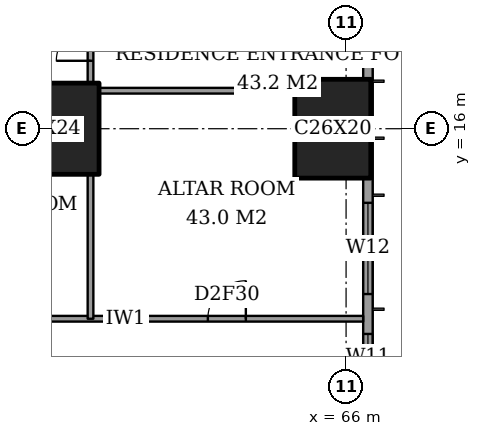
"""IFC4 building model, lengths in metres.
Left out: names, types, materials, properties, quantities, classifications, styles, units other than length and angle.
Written with IfcOpenShell. Run it as: python <this file> out.ifc"""

import sys

from ifc_helpers import new_model, si_unit, direction, frame, frame_2d, origin, origin_2d, place, context, subcontext, project, spatial, rectangle, extrude, element, fill, save


model = new_model("IFC4")
c1 = context("Model", 3, precision=1e-05, world=origin(), true_north=direction((0.0, 1.0)))
c2 = subcontext(c1, "Body", "Model", "MODEL_VIEW")
j1 = project(units=[si_unit("LENGTHUNIT", "METRE"), si_unit("PLANEANGLEUNIT", "RADIAN")], contexts=[c1])
p1 = place(None, origin())
s1 = spatial("IfcSite", under=j1, at=p1, CompositionType="ELEMENT")
p2 = place(p1, origin())
s2 = spatial("IfcBuilding", under=s1, at=p2, CompositionType="ELEMENT")
p3 = place(p2, frame((0.0, 0.0, 153.8)))
s3 = spatial("IfcBuildingStorey", under=s2, at=p3, CompositionType="ELEMENT", Elevation=153.8)
p4 = place(p3, frame((58.0, 16.0, 0.0), z_axis=(0.0, 0.0, 1.0), x_axis=(1.0, 0.0, 0.0)))
e1 = element("IfcColumn", 1, at=p4, inside=s3, PredefinedType="COLUMN", context=c2, shape_type="SweptSolid", body=[
    extrude(rectangle(XDim=3.0, YDim=2.4, at=origin_2d()), origin(), (0.0, 0.0, 1.0), 3.6),
])
p5 = place(p3, frame((65.65, 16.0, 0.0), z_axis=(0.0, 0.0, 1.0), x_axis=(0.0, 1.0, 0.0)))
e2 = element("IfcColumn", 2, at=p5, inside=s3, PredefinedType="COLUMN", context=c2, shape_type="SweptSolid", body=[
    extrude(rectangle(XDim=2.6, YDim=2.0, at=origin_2d()), origin(), (0.0, 0.0, 1.0), 3.6),
])
p6 = place(p3, frame((66.575, 3.175, 0.0), z_axis=(0.0, 0.0, 1.0), x_axis=(0.0, 1.0, 0.0)))
e3 = element("IfcWall", 3, at=p6, inside=s3, PredefinedType="SOLIDWALL", context=c2, shape_type="SweptSolid", body=[
    extrude(rectangle(XDim=41.65, YDim=0.25, at=frame_2d((20.825, 0.0))), origin(), (0.0, 0.0, 1.0), 3.6),
])
p7 = place(p6, frame((0.775, 0.0, 0.4)))
e4 = element("IfcOpeningElement", 4, at=p7, cuts=e3, PredefinedType="OPENING", context=c2, shape_type="SweptSolid", body=[
    extrude(rectangle(XDim=2.4, YDim=2.2, at=frame_2d((1.2, 1.1))), frame((0.0, 0.135, 0.0), z_axis=(0.0, -1.0, 0.0), x_axis=(1.0, 0.0, 0.0)), (0.0, 0.0, 1.0), 0.27),
])
p8 = place(p6, frame((6.225, 0.0, 0.4)))
e5 = element("IfcOpeningElement", 5, at=p8, cuts=e3, PredefinedType="OPENING", context=c2, shape_type="SweptSolid", body=[
    extrude(rectangle(XDim=1.2, YDim=2.2, at=frame_2d((0.6, 1.1))), frame((0.0, 0.135, 0.0), z_axis=(0.0, -1.0, 0.0), x_axis=(1.0, 0.0, 0.0)), (0.0, 0.0, 1.0), 0.27),
])
p9 = place(p6, frame((8.475, 0.0, 0.4)))
e6 = element("IfcOpeningElement", 6, at=p9, cuts=e3, PredefinedType="OPENING", context=c2, shape_type="SweptSolid", body=[
    extrude(rectangle(XDim=2.4, YDim=2.2, at=frame_2d((1.2, 1.1))), frame((0.0, 0.135, 0.0), z_axis=(0.0, -1.0, 0.0), x_axis=(1.0, 0.0, 0.0)), (0.0, 0.0, 1.0), 0.27),
])
p10 = place(p6, frame((15.775, 0.0, 0.4)))
e7 = element("IfcOpeningElement", 7, at=p10, cuts=e3, PredefinedType="OPENING", context=c2, shape_type="SweptSolid", body=[
    extrude(rectangle(XDim=2.4, YDim=2.2, at=frame_2d((1.2, 1.1))), frame((0.0, 0.135, 0.0), z_axis=(0.0, -1.0, 0.0), x_axis=(1.0, 0.0, 0.0)), (0.0, 0.0, 1.0), 0.27),
])
p11 = place(p6, frame((23.475, 0.0, 0.4)))
e8 = element("IfcOpeningElement", 8, at=p11, cuts=e3, PredefinedType="OPENING", context=c2, shape_type="SweptSolid", body=[
    extrude(rectangle(XDim=2.4, YDim=2.2, at=frame_2d((1.2, 1.1))), frame((0.0, 0.135, 0.0), z_axis=(0.0, -1.0, 0.0), x_axis=(1.0, 0.0, 0.0)), (0.0, 0.0, 1.0), 0.27),
])
p12 = place(p6, frame((30.975, 0.0, 0.4)))
e9 = element("IfcOpeningElement", 9, at=p12, cuts=e3, PredefinedType="OPENING", context=c2, shape_type="SweptSolid", body=[
    extrude(rectangle(XDim=2.4, YDim=2.2, at=frame_2d((1.2, 1.1))), frame((0.0, 0.135, 0.0), z_axis=(0.0, -1.0, 0.0), x_axis=(1.0, 0.0, 0.0)), (0.0, 0.0, 1.0), 0.27),
])
p13 = place(p6, frame((34.5, 0.0, 0.4)))
e10 = element("IfcOpeningElement", 10, at=p13, cuts=e3, PredefinedType="OPENING", context=c2, shape_type="SweptSolid", body=[
    extrude(rectangle(XDim=1.2, YDim=2.2, at=frame_2d((0.6, 1.1))), frame((0.0, 0.135, 0.0), z_axis=(0.0, -1.0, 0.0), x_axis=(1.0, 0.0, 0.0)), (0.0, 0.0, 1.0), 0.27),
])
p14 = place(p6, frame((38.475, 0.0, 0.4)))
e11 = element("IfcOpeningElement", 11, at=p14, cuts=e3, PredefinedType="OPENING", context=c2, shape_type="SweptSolid", body=[
    extrude(rectangle(XDim=2.4, YDim=2.2, at=frame_2d((1.2, 1.1))), frame((0.0, 0.135, 0.0), z_axis=(0.0, -1.0, 0.0), x_axis=(1.0, 0.0, 0.0)), (0.0, 0.0, 1.0), 0.27),
])
p15 = place(p3, frame((41.439, 11.0, 0.0), z_axis=(0.0, 0.0, 1.0), x_axis=(1.0, 0.0, 0.0)))
e12 = element("IfcWall", 12, at=p15, inside=s3, PredefinedType="PARTITIONING", context=c2, shape_type="SweptSolid", body=[
    extrude(rectangle(XDim=25.011, YDim=0.15, at=frame_2d((12.505, 0.0))), origin(), (0.0, 0.0, 1.0), 3.35),
])
p16 = place(p15, frame((12.361, 0.0, 0.0)))
e13 = element("IfcOpeningElement", 13, at=p16, cuts=e12, PredefinedType="OPENING", context=c2, shape_type="SweptSolid", body=[
    extrude(rectangle(XDim=1.0, YDim=2.1, at=frame_2d((0.5, 1.05))), frame((0.0, 0.085, 0.0), z_axis=(0.0, -1.0, 0.0), x_axis=(1.0, 0.0, 0.0)), (0.0, 0.0, 1.0), 0.17),
])
p17 = place(p15, frame((20.924, 0.0, 0.0)))
e14 = element("IfcOpeningElement", 14, at=p17, cuts=e12, PredefinedType="OPENING", context=c2, shape_type="SweptSolid", body=[
    extrude(rectangle(XDim=1.0, YDim=2.1, at=frame_2d((0.5, 1.05))), frame((0.0, 0.085, 0.0), z_axis=(0.0, -1.0, 0.0), x_axis=(1.0, 0.0, 0.0)), (0.0, 0.0, 1.0), 0.17),
])
p18 = place(p15, frame((15.448, 0.0, 0.0)))
e15 = element("IfcOpeningElement", 15, at=p18, cuts=e12, PredefinedType="OPENING", context=c2, shape_type="SweptSolid", body=[
    extrude(rectangle(XDim=0.9, YDim=2.1, at=frame_2d((0.45, 1.05))), frame((0.0, 0.085, 0.0), z_axis=(0.0, -1.0, 0.0), x_axis=(1.0, 0.0, 0.0)), (0.0, 0.0, 1.0), 0.17),
])
p19 = place(p15, frame((9.961, 0.0, 0.0)))
e16 = element("IfcOpeningElement", 16, at=p19, cuts=e12, PredefinedType="OPENING", context=c2, shape_type="SweptSolid", body=[
    extrude(rectangle(XDim=1.0, YDim=2.1, at=frame_2d((0.5, 1.05))), frame((0.0, 0.085, 0.0), z_axis=(0.0, -1.0, 0.0), x_axis=(1.0, 0.0, 0.0)), (0.0, 0.0, 1.0), 0.17),
])
p20 = place(p15, frame((7.411, 0.0, 0.0)))
e17 = element("IfcOpeningElement", 17, at=p20, cuts=e12, PredefinedType="OPENING", context=c2, shape_type="SweptSolid", body=[
    extrude(rectangle(XDim=0.9, YDim=2.1, at=frame_2d((0.45, 1.05))), frame((0.0, 0.085, 0.0), z_axis=(0.0, -1.0, 0.0), x_axis=(1.0, 0.0, 0.0)), (0.0, 0.0, 1.0), 0.17),
])
p21 = place(p15, frame((2.836, 0.0, 0.0)))
e18 = element("IfcOpeningElement", 18, at=p21, cuts=e12, PredefinedType="OPENING", context=c2, shape_type="SweptSolid", body=[
    extrude(rectangle(XDim=1.0, YDim=2.1, at=frame_2d((0.5, 1.05))), frame((0.0, 0.085, 0.0), z_axis=(0.0, -1.0, 0.0), x_axis=(1.0, 0.0, 0.0)), (0.0, 0.0, 1.0), 0.17),
])
p22 = place(p3, frame((59.5, 17.0, 0.0), z_axis=(0.0, 0.0, 1.0), x_axis=(1.0, 0.0, 0.0)))
e19 = element("IfcWall", 19, at=p22, inside=s3, PredefinedType="PARTITIONING", context=c2, shape_type="SweptSolid", body=[
    extrude(rectangle(XDim=5.15, YDim=0.15, at=frame_2d((2.575, 0.0))), origin(), (0.0, 0.0, 1.0), 3.35),
])
p23 = place(p3, frame((59.275, 11.0, 0.0), z_axis=(0.0, 0.0, 1.0), x_axis=(0.0, 1.0, 0.0)))
e20 = element("IfcWall", 20, at=p23, inside=s3, PredefinedType="PARTITIONING", context=c2, shape_type="SweptSolid", body=[
    extrude(rectangle(XDim=3.8, YDim=0.15, at=frame_2d((1.9, 0.0))), origin(), (0.0, 0.0, 1.0), 3.35),
])
p24 = place(p3, frame((59.275, 17.2, 0.0), z_axis=(0.0, 0.0, 1.0), x_axis=(0.0, 1.0, 0.0)))
e21 = element("IfcWall", 21, at=p24, inside=s3, PredefinedType="PARTITIONING", context=c2, shape_type="SweptSolid", body=[
    extrude(rectangle(XDim=2.45, YDim=0.15, at=frame_2d((1.225, 0.0))), origin(), (0.0, 0.0, 1.0), 3.35),
])
p25 = place(p24, frame((0.587, 0.0, 0.0)))
e22 = element("IfcOpeningElement", 22, at=p25, cuts=e21, PredefinedType="OPENING", context=c2, shape_type="SweptSolid", body=[
    extrude(rectangle(XDim=0.9, YDim=2.1, at=frame_2d((0.45, 1.05))), frame((0.0, 0.085, 0.0), z_axis=(0.0, -1.0, 0.0), x_axis=(1.0, 0.0, 0.0)), (0.0, 0.0, 1.0), 0.17),
])
p26 = place(p8, origin())
e23 = element("IfcWindow", 23, at=p26, inside=s3, PartitioningType="SINGLE_PANEL", PredefinedType="WINDOW", context=c2, shape_type="SweptSolid", body=[
    extrude(rectangle(XDim=1.2, YDim=2.2, at=frame_2d((0.6, 1.1))), frame((0.0, 0.03, 0.0), z_axis=(0.0, -1.0, 0.0), x_axis=(1.0, 0.0, 0.0)), (0.0, 0.0, 1.0), 0.06),
])
fill(e5, e23)
p27 = place(p9, origin())
e24 = element("IfcWindow", 24, at=p27, inside=s3, PartitioningType="SINGLE_PANEL", PredefinedType="WINDOW", context=c2, shape_type="SweptSolid", body=[
    extrude(rectangle(XDim=2.4, YDim=2.2, at=frame_2d((1.2, 1.1))), frame((0.0, 0.03, 0.0), z_axis=(0.0, -1.0, 0.0), x_axis=(1.0, 0.0, 0.0)), (0.0, 0.0, 1.0), 0.06),
])
fill(e6, e24)
p28 = place(p17, origin())
e25 = element("IfcDoor", 25, at=p28, inside=s3, OperationType="SINGLE_SWING_LEFT", PredefinedType="DOOR", context=c2, shape_type="SweptSolid", body=[
    extrude(rectangle(XDim=1.0, YDim=2.1, at=frame_2d((0.5, 1.05))), frame((0.0, 0.025, 0.0), z_axis=(0.0, -1.0, 0.0), x_axis=(1.0, 0.0, 0.0)), (0.0, 0.0, 1.0), 0.05),
])
fill(e14, e25)
p29 = place(p25, origin())
e26 = element("IfcDoor", 26, at=p29, inside=s3, OperationType="SINGLE_SWING_RIGHT", PredefinedType="DOOR", context=c2, shape_type="SweptSolid", body=[
    extrude(rectangle(XDim=0.9, YDim=2.1, at=frame_2d((0.45, 1.05))), frame((0.0, 0.025, 0.0), z_axis=(0.0, -1.0, 0.0), x_axis=(1.0, 0.0, 0.0)), (0.0, 0.0, 1.0), 0.05),
])
fill(e22, e26)
save(model, sys.argv[1])
